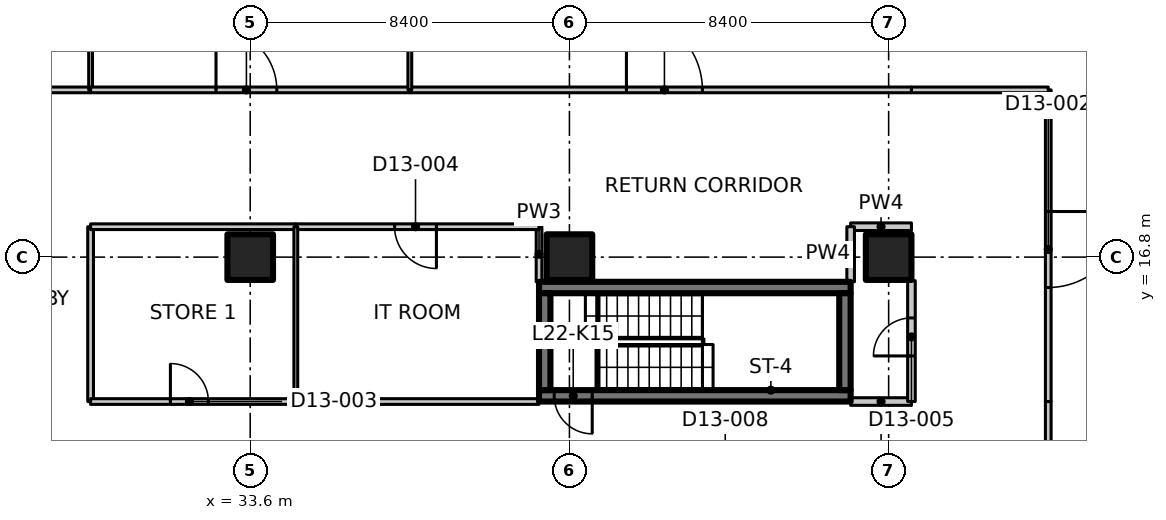
"""IFC4 building model, lengths in metres.
Left out: names, types, materials, properties, quantities, classifications, styles, units other than length and angle.
Written with IfcOpenShell. Run it as: python <this file> out.ifc"""

import sys

from ifc_helpers import new_model, si_unit, direction, frame, frame_2d, origin, origin_2d, place, context, subcontext, project, spatial, polyline, rectangle, outline, extrude, element, fill, save


model = new_model("IFC4")
c1 = context("Model", 3, precision=1e-05, world=origin(), true_north=direction((0.0, 1.0)))
c2 = subcontext(c1, "Body", "Model", "MODEL_VIEW")
j1 = project(units=[si_unit("LENGTHUNIT", "METRE"), si_unit("PLANEANGLEUNIT", "RADIAN")], contexts=[c1])
p1 = place(None, origin())
s1 = spatial("IfcSite", under=j1, at=p1, CompositionType="ELEMENT")
p2 = place(p1, origin())
s2 = spatial("IfcBuilding", under=s1, at=p2, CompositionType="ELEMENT")
p3 = place(p2, frame((0.0, 0.0, 95.3)))
s3 = spatial("IfcBuildingStorey", under=s2, at=p3, CompositionType="ELEMENT", Elevation=95.3)
for number, where, z_axis, x_axis in (
    (1, (33.6, 16.8, 0.0), (0.0, 0.0, 1.0), (1.0, 0.0, 0.0)),
    (2, (42.0, 16.8, 0.0), (0.0, 0.0, 1.0), (1.0, 0.0, 0.0)),
    (3, (50.4, 16.8, 0.0), (0.0, 0.0, 1.0), (1.0, 0.0, 0.0)),
):
    element("IfcColumn", number, at=place(p3, frame(where, z_axis=z_axis, x_axis=x_axis)), inside=s3, PredefinedType="COLUMN", context=c2, shape_type="SweptSolid", body=[
        extrude(rectangle(XDim=1.2, YDim=1.2, at=origin_2d()), origin(), (0.0, 0.0, 1.0), 3.35),
    ])
p4 = place(p3, frame((49.4, 13.15, 0.0), z_axis=(0.0, 0.0, 1.0), x_axis=(-1.0, 0.0, 0.0)))
e4 = element("IfcWall", 4, at=p4, inside=s3, PredefinedType="SHEAR", context=c2, shape_type="SweptSolid", body=[
    extrude(rectangle(XDim=8.2, YDim=0.3, at=frame_2d((4.1, 0.0))), origin(), (0.0, 0.0, 1.0), 3.35),
])
p5 = place(p4, frame((6.8, 0.0, 0.0)))
e5 = element("IfcOpeningElement", 5, at=p5, cuts=e4, PredefinedType="OPENING", context=c2, shape_type="SweptSolid", body=[
    extrude(rectangle(XDim=1.0, YDim=2.1, at=frame_2d((0.5, 1.05))), frame((0.0, 0.16, 0.0), z_axis=(0.0, -1.0, 0.0), x_axis=(1.0, 0.0, 0.0)), (0.0, 0.0, 1.0), 0.32),
])
p6 = place(p3, frame((41.2, 16.0, 0.0), z_axis=(0.0, 0.0, 1.0), x_axis=(1.0, 0.0, 0.0)))
e6 = element("IfcWall", 6, at=p6, inside=s3, PredefinedType="SHEAR", context=c2, shape_type="SweptSolid", body=[
    extrude(rectangle(XDim=8.2, YDim=0.3, at=frame_2d((4.1, 0.0))), origin(), (0.0, 0.0, 1.0), 3.35),
])
for number, where, z_axis, x_axis in (
    (7, (41.35, 13.3, 0.0), (0.0, 0.0, 1.0), (0.0, 1.0, 0.0)),
    (8, (49.25, 13.3, 0.0), (0.0, 0.0, 1.0), (0.0, 1.0, 0.0)),
):
    element("IfcWall", number, at=place(p3, frame(where, z_axis=z_axis, x_axis=x_axis)), inside=s3, PredefinedType="SHEAR", context=c2, shape_type="SweptSolid", body=[
        extrude(rectangle(XDim=2.55, YDim=0.3, at=frame_2d((1.275, 0.0))), origin(), (0.0, 0.0, 1.0), 3.35),
    ])
p7 = place(p3, frame((25.2, 21.2, 0.0), z_axis=(0.0, 0.0, 1.0), x_axis=(1.0, 0.0, 0.0)))
e9 = element("IfcWall", 9, at=p7, inside=s3, PredefinedType="PARTITIONING", context=c2, shape_type="SweptSolid", body=[
    extrude(rectangle(XDim=4.2, YDim=0.15, at=frame_2d((2.1, 0.0))), origin(), (0.0, 0.0, 1.0), 3.33),
])
p8 = place(p3, frame((29.4, 17.6, 0.0), z_axis=(0.0, 0.0, 1.0), x_axis=(0.0, -1.0, 0.0)))
e10 = element("IfcWall", 10, at=p8, inside=s3, PredefinedType="PARTITIONING", context=c2, shape_type="SweptSolid", body=[
    extrude(rectangle(XDim=4.6, YDim=0.15, at=frame_2d((2.3, 0.0))), origin(), (0.0, 0.0, 1.0), 3.33),
])
p9 = place(p3, frame((29.4, 27.429, 0.0), z_axis=(0.0, 0.0, 1.0), x_axis=(0.0, -1.0, 0.0)))
e11 = element("IfcWall", 11, at=p9, inside=s3, PredefinedType="PARTITIONING", context=c2, shape_type="SweptSolid", body=[
    extrude(outline(polyline([(0.0, 0.0), (6.229, 0.0), (6.229, 3.33), (2.679, 3.33), (2.677, 2.98), (1.781, 2.98), (1.779, 3.33), (0.154, 3.33), (0.0, 3.33), (0.0, 0.0)])), frame((0.0, 0.05, 0.0), z_axis=(0.0, -1.0, 0.0), x_axis=(1.0, 0.0, 0.0)), (0.0, 0.0, 1.0), 0.1),
])
p10 = place(p3, frame((54.6, 13.0, 0.0), z_axis=(0.0, 0.0, 1.0), x_axis=(0.0, -1.0, 0.0)))
e12 = element("IfcWall", 12, at=p10, inside=s3, PredefinedType="PARTITIONING", context=c2, shape_type="SweptSolid", body=[
    extrude(rectangle(XDim=3.4, YDim=0.15, at=frame_2d((1.7, 0.0))), origin(), (0.0, 0.0, 1.0), 3.33),
])
p11 = place(p3, frame((29.4, 13.0, 0.0), z_axis=(0.0, 0.0, 1.0), x_axis=(1.0, 0.0, 0.0)))
e13 = element("IfcWall", 13, at=p11, inside=s3, PredefinedType="PARTITIONING", context=c2, shape_type="SweptSolid", body=[
    extrude(rectangle(XDim=5.4, YDim=0.15, at=frame_2d((2.7, 0.0))), origin(), (0.0, 0.0, 1.0), 3.33),
])
p12 = place(p11, frame((2.1, 0.0, 0.0)))
e14 = element("IfcOpeningElement", 14, at=p12, cuts=e13, PredefinedType="OPENING", context=c2, shape_type="SweptSolid", body=[
    extrude(rectangle(XDim=1.0, YDim=2.1, at=frame_2d((0.5, 1.05))), frame((0.0, 0.085, 0.0), z_axis=(0.0, -1.0, 0.0), x_axis=(1.0, 0.0, 0.0)), (0.0, 0.0, 1.0), 0.17),
])
p13 = place(p3, frame((34.8, 13.0, 0.0), z_axis=(0.0, 0.0, 1.0), x_axis=(1.0, 0.0, 0.0)))
e15 = element("IfcWall", 15, at=p13, inside=s3, PredefinedType="PARTITIONING", context=c2, shape_type="SweptSolid", body=[
    extrude(rectangle(XDim=6.4, YDim=0.15, at=frame_2d((3.2, 0.0))), origin(), (0.0, 0.0, 1.0), 3.33),
])
p14 = place(p3, frame((49.4, 13.0, 0.0), z_axis=(0.0, 0.0, 1.0), x_axis=(1.0, 0.0, 0.0)))
e16 = element("IfcWall", 16, at=p14, inside=s3, PredefinedType="PARTITIONING", context=c2, shape_type="SweptSolid", body=[
    extrude(rectangle(XDim=1.6, YDim=0.2, at=frame_2d((0.8, 0.0))), origin(), (0.0, 0.0, 1.0), 3.33),
])
p15 = place(p3, frame((54.6, 21.2, 0.0), z_axis=(0.0, 0.0, 1.0), x_axis=(0.0, -1.0, 0.0)))
e17 = element("IfcWall", 17, at=p15, inside=s3, PredefinedType="PARTITIONING", context=c2, shape_type="SweptSolid", body=[
    extrude(rectangle(XDim=8.2, YDim=0.15, at=frame_2d((4.1, 0.0))), origin(), (0.0, 0.0, 1.0), 3.33),
])
p16 = place(p15, frame((3.2, 0.0, 0.0)))
e18 = element("IfcOpeningElement", 18, at=p16, cuts=e17, PredefinedType="OPENING", context=c2, shape_type="SweptSolid", body=[
    extrude(rectangle(XDim=2.0, YDim=2.4, at=frame_2d((1.0, 1.2))), frame((0.0, 0.085, 0.0), z_axis=(0.0, -1.0, 0.0), x_axis=(1.0, 0.0, 0.0)), (0.0, 0.0, 1.0), 0.17),
])
p17 = place(p3, frame((34.8, 17.6, 0.0), z_axis=(0.0, 0.0, 1.0), x_axis=(-1.0, 0.0, 0.0)))
e19 = element("IfcWall", 19, at=p17, inside=s3, PredefinedType="PARTITIONING", context=c2, shape_type="SweptSolid", body=[
    extrude(rectangle(XDim=5.4, YDim=0.15, at=frame_2d((2.7, 0.0))), origin(), (0.0, 0.0, 1.0), 3.33),
])
p18 = place(p3, frame((41.2, 16.15, 0.0), z_axis=(0.0, 0.0, 1.0), x_axis=(0.0, 1.0, 0.0)))
e20 = element("IfcWall", 20, at=p18, inside=s3, PredefinedType="PARTITIONING", context=c2, shape_type="SweptSolid", body=[
    extrude(rectangle(XDim=1.45, YDim=0.15, at=frame_2d((0.725, 0.0))), origin(), (0.0, 0.0, 1.0), 3.33),
])
p19 = place(p3, frame((41.2, 17.6, 0.0), z_axis=(0.0, 0.0, 1.0), x_axis=(-1.0, 0.0, 0.0)))
e21 = element("IfcWall", 21, at=p19, inside=s3, PredefinedType="PARTITIONING", context=c2, shape_type="SweptSolid", body=[
    extrude(rectangle(XDim=6.4, YDim=0.15, at=frame_2d((3.2, 0.0))), origin(), (0.0, 0.0, 1.0), 3.33),
])
p20 = place(p19, frame((2.7, 0.0, 0.0)))
e22 = element("IfcOpeningElement", 22, at=p20, cuts=e21, PredefinedType="OPENING", context=c2, shape_type="SweptSolid", body=[
    extrude(rectangle(XDim=1.1, YDim=2.1, at=frame_2d((0.55, 1.05))), frame((0.0, 0.085, 0.0), z_axis=(0.0, -1.0, 0.0), x_axis=(1.0, 0.0, 0.0)), (0.0, 0.0, 1.0), 0.17),
])
p21 = place(p3, frame((51.0, 17.6, 0.0), z_axis=(0.0, 0.0, 1.0), x_axis=(-1.0, 0.0, 0.0)))
e23 = element("IfcWall", 23, at=p21, inside=s3, PredefinedType="PARTITIONING", context=c2, shape_type="SweptSolid", body=[
    extrude(rectangle(XDim=1.6, YDim=0.2, at=frame_2d((0.8, 0.0))), origin(), (0.0, 0.0, 1.0), 3.33),
])
p22 = place(p3, frame((49.4, 17.6, 0.0), z_axis=(0.0, 0.0, 1.0), x_axis=(0.0, -1.0, 0.0)))
e24 = element("IfcWall", 24, at=p22, inside=s3, PredefinedType="PARTITIONING", context=c2, shape_type="SweptSolid", body=[
    extrude(rectangle(XDim=1.45, YDim=0.2, at=frame_2d((0.725, 0.0))), origin(), (0.0, 0.0, 1.0), 3.33),
])
p23 = place(p3, frame((29.4, 21.2, 0.0), z_axis=(0.0, 0.0, 1.0), x_axis=(1.0, 0.0, 0.0)))
e25 = element("IfcWall", 25, at=p23, inside=s3, PredefinedType="PARTITIONING", context=c2, shape_type="SweptSolid", body=[
    extrude(rectangle(XDim=8.4, YDim=0.15, at=frame_2d((4.2, 0.0))), origin(), (0.0, 0.0, 1.0), 3.33),
])
p24 = place(p23, frame((3.3, 0.0, 0.0)))
e26 = element("IfcOpeningElement", 26, at=p24, cuts=e25, PredefinedType="OPENING", context=c2, shape_type="SweptSolid", body=[
    extrude(rectangle(XDim=1.6, YDim=2.1, at=frame_2d((0.8, 1.05))), frame((0.0, 0.085, 0.0), z_axis=(0.0, -1.0, 0.0), x_axis=(1.0, 0.0, 0.0)), (0.0, 0.0, 1.0), 0.17),
])
p25 = place(p3, frame((37.8, 21.2, 0.0), z_axis=(0.0, 0.0, 1.0), x_axis=(1.0, 0.0, 0.0)))
e27 = element("IfcWall", 27, at=p25, inside=s3, PredefinedType="PARTITIONING", context=c2, shape_type="SweptSolid", body=[
    extrude(rectangle(XDim=13.2, YDim=0.15, at=frame_2d((6.6, 0.0))), origin(), (0.0, 0.0, 1.0), 3.33),
])
p26 = place(p25, frame((5.7, 0.0, 0.0)))
e28 = element("IfcOpeningElement", 28, at=p26, cuts=e27, PredefinedType="OPENING", context=c2, shape_type="SweptSolid", body=[
    extrude(rectangle(XDim=2.0, YDim=2.4, at=frame_2d((1.0, 1.2))), frame((0.0, 0.085, 0.0), z_axis=(0.0, -1.0, 0.0), x_axis=(1.0, 0.0, 0.0)), (0.0, 0.0, 1.0), 0.17),
])
p27 = place(p3, frame((51.0, 13.0, 0.0), z_axis=(0.0, 0.0, 1.0), x_axis=(0.0, 1.0, 0.0)))
e29 = element("IfcWall", 29, at=p27, inside=s3, PredefinedType="PARTITIONING", context=c2, shape_type="SweptSolid", body=[
    extrude(rectangle(XDim=3.18, YDim=0.2, at=frame_2d((1.59, 0.0))), origin(), (0.0, 0.0, 1.0), 3.33),
])
p28 = place(p27, frame((1.2, 0.0, 0.0)))
e30 = element("IfcOpeningElement", 30, at=p28, cuts=e29, PredefinedType="OPENING", context=c2, shape_type="SweptSolid", body=[
    extrude(rectangle(XDim=1.0, YDim=2.1, at=frame_2d((0.5, 1.05))), frame((0.0, 0.11, 0.0), z_axis=(0.0, -1.0, 0.0), x_axis=(1.0, 0.0, 0.0)), (0.0, 0.0, 1.0), 0.22),
])
p29 = place(p3, frame((51.0, 21.2, 0.0), z_axis=(0.0, 0.0, 1.0), x_axis=(1.0, 0.0, 0.0)))
e31 = element("IfcWall", 31, at=p29, inside=s3, PredefinedType="PARTITIONING", context=c2, shape_type="SweptSolid", body=[
    extrude(rectangle(XDim=3.6, YDim=0.15, at=frame_2d((1.8, 0.0))), origin(), (0.0, 0.0, 1.0), 3.33),
])
p30 = place(p3, frame((34.8, 17.6, 0.0), z_axis=(0.0, 0.0, 1.0), x_axis=(0.0, -1.0, 0.0)))
e32 = element("IfcWall", 32, at=p30, inside=s3, PredefinedType="PARTITIONING", context=c2, shape_type="SweptSolid", body=[
    extrude(rectangle(XDim=4.6, YDim=0.1, at=frame_2d((2.3, 0.0))), origin(), (0.0, 0.0, 1.0), 3.33),
])
p31 = place(p3, frame((37.8, 30.243, 0.0), z_axis=(0.0, 0.0, 1.0), x_axis=(0.0, -1.0, 0.0)))
e33 = element("IfcWall", 33, at=p31, inside=s3, PredefinedType="PARTITIONING", context=c2, shape_type="SweptSolid", body=[
    extrude(outline(polyline([(0.0, 0.0), (9.043, 0.0), (9.043, 3.33), (5.493, 3.33), (5.491, 2.98), (4.595, 2.98), (4.593, 3.33), (0.0, 3.33), (0.0, 0.0)])), frame((0.0, 0.05, 0.0), z_axis=(0.0, -1.0, 0.0), x_axis=(1.0, 0.0, 0.0)), (0.0, 0.0, 1.0), 0.1),
])
p32 = place(p5, origin())
e34 = element("IfcDoor", 34, at=p32, inside=s3, OperationType="SINGLE_SWING_RIGHT", PredefinedType="DOOR", context=c2, shape_type="SweptSolid", body=[
    extrude(rectangle(XDim=1.0, YDim=2.1, at=frame_2d((0.5, 1.05))), frame((0.0, 0.025, 0.0), z_axis=(0.0, -1.0, 0.0), x_axis=(1.0, 0.0, 0.0)), (0.0, 0.0, 1.0), 0.05),
])
fill(e5, e34)
p33 = place(p16, origin())
e35 = element("IfcDoor", 35, at=p33, inside=s3, OperationType="DOUBLE_DOOR_SINGLE_SWING", PredefinedType="DOOR", context=c2, shape_type="SweptSolid", body=[
    extrude(rectangle(XDim=2.0, YDim=2.4, at=frame_2d((1.0, 1.2))), frame((0.0, 0.025, 0.0), z_axis=(0.0, -1.0, 0.0), x_axis=(1.0, 0.0, 0.0)), (0.0, 0.0, 1.0), 0.05),
])
fill(e18, e35)
p34 = place(p12, origin())
e36 = element("IfcDoor", 36, at=p34, inside=s3, OperationType="SINGLE_SWING_LEFT", PredefinedType="DOOR", context=c2, shape_type="SweptSolid", body=[
    extrude(rectangle(XDim=1.0, YDim=2.1, at=frame_2d((0.5, 1.05))), frame((0.0, 0.025, 0.0), z_axis=(0.0, -1.0, 0.0), x_axis=(1.0, 0.0, 0.0)), (0.0, 0.0, 1.0), 0.05),
])
fill(e14, e36)
p35 = place(p20, origin())
e37 = element("IfcDoor", 37, at=p35, inside=s3, OperationType="SINGLE_SWING_LEFT", PredefinedType="DOOR", context=c2, shape_type="SweptSolid", body=[
    extrude(rectangle(XDim=1.1, YDim=2.1, at=frame_2d((0.55, 1.05))), frame((0.0, 0.025, 0.0), z_axis=(0.0, -1.0, 0.0), x_axis=(1.0, 0.0, 0.0)), (0.0, 0.0, 1.0), 0.05),
])
fill(e22, e37)
p36 = place(p28, origin())
e38 = element("IfcDoor", 38, at=p36, inside=s3, OperationType="SINGLE_SWING_LEFT", PredefinedType="DOOR", context=c2, shape_type="SweptSolid", body=[
    extrude(rectangle(XDim=1.0, YDim=2.1, at=frame_2d((0.5, 1.05))), frame((0.0, 0.025, 0.0), z_axis=(0.0, -1.0, 0.0), x_axis=(1.0, 0.0, 0.0)), (0.0, 0.0, 1.0), 0.05),
])
fill(e30, e38)
p37 = place(p24, origin())
e39 = element("IfcDoor", 39, at=p37, inside=s3, OperationType="DOUBLE_DOOR_SINGLE_SWING", PredefinedType="DOOR", context=c2, shape_type="SweptSolid", body=[
    extrude(rectangle(XDim=1.6, YDim=2.1, at=frame_2d((0.8, 1.05))), frame((0.0, 0.025, 0.0), z_axis=(0.0, -1.0, 0.0), x_axis=(1.0, 0.0, 0.0)), (0.0, 0.0, 1.0), 0.05),
])
fill(e26, e39)
p38 = place(p26, origin())
e40 = element("IfcDoor", 40, at=p38, inside=s3, OperationType="DOUBLE_DOOR_SINGLE_SWING", PredefinedType="DOOR", context=c2, shape_type="SweptSolid", body=[
    extrude(rectangle(XDim=2.0, YDim=2.4, at=frame_2d((1.0, 1.2))), frame((0.0, 0.025, 0.0), z_axis=(0.0, -1.0, 0.0), x_axis=(1.0, 0.0, 0.0)), (0.0, 0.0, 1.0), 0.05),
])
fill(e28, e40)
save(model, sys.argv[1])
